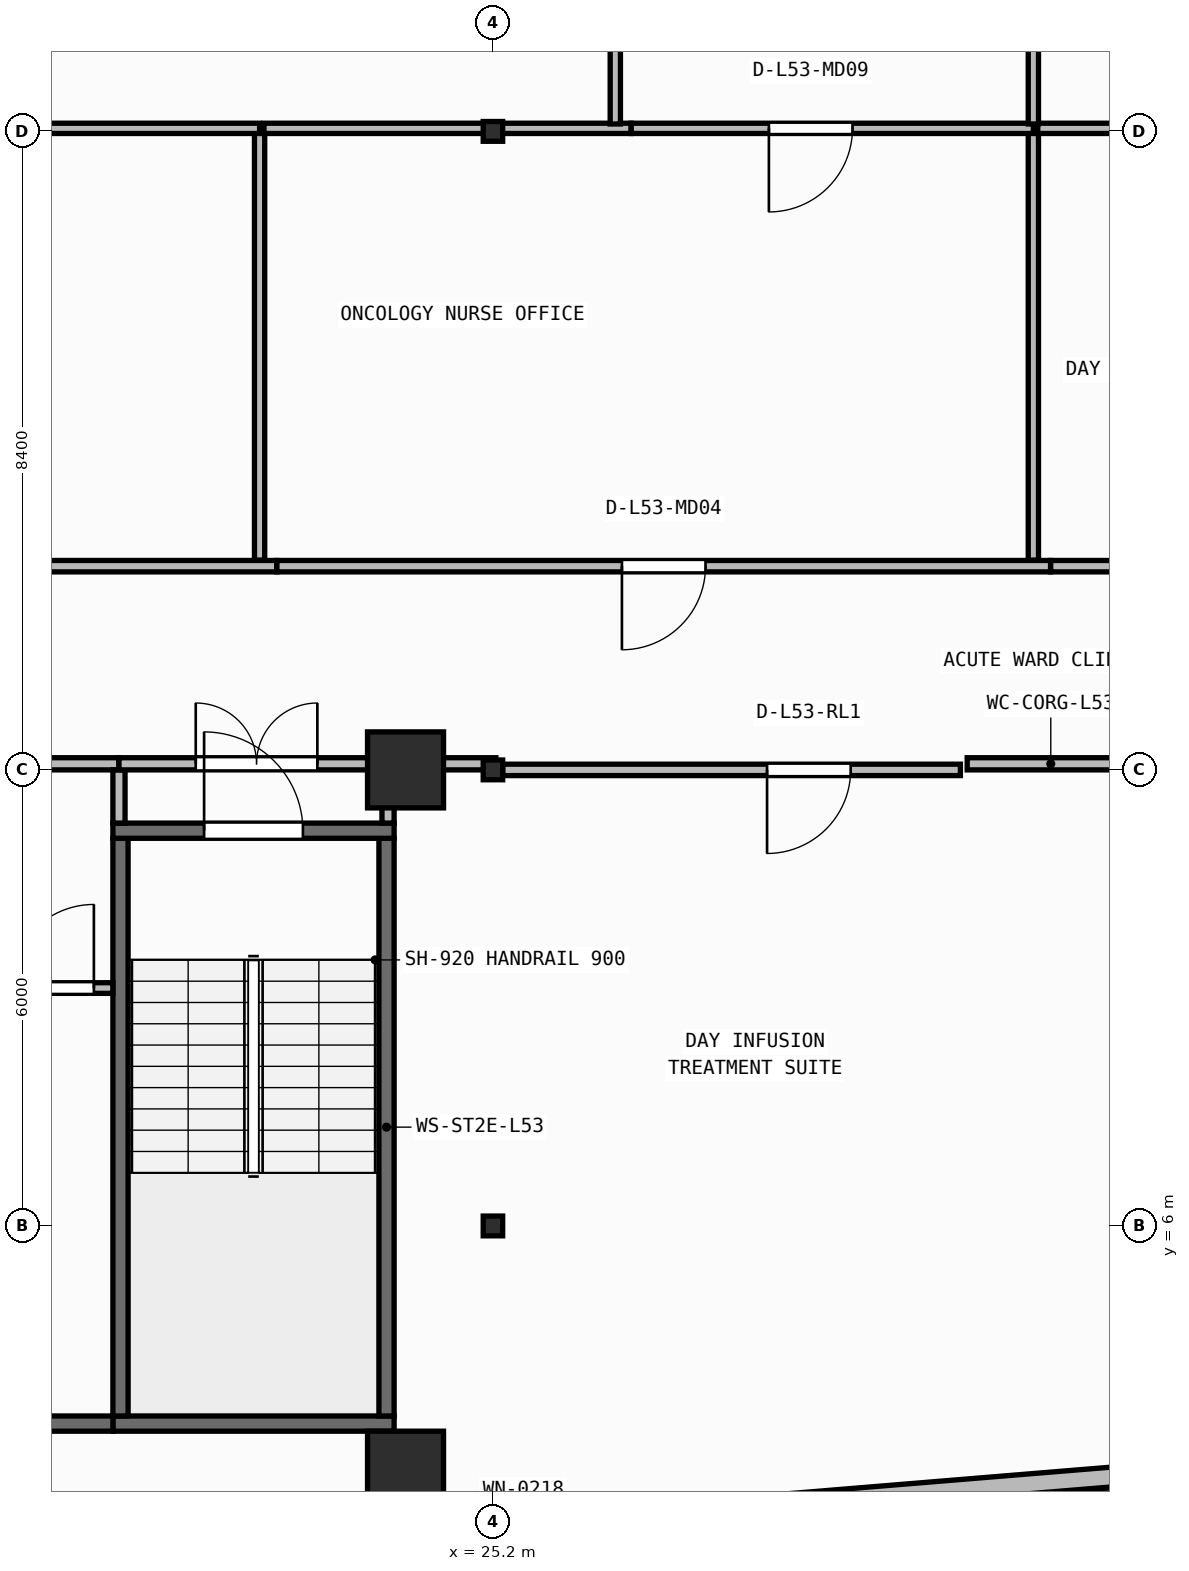
"""IFC4 building model, lengths in metres.
Left out: names, types, materials, properties, quantities, classifications, styles, units other than length and angle.
Written with IfcOpenShell. Run it as: python <this file> out.ifc"""

import sys

from ifc_helpers import new_model, si_unit, direction, frame, frame_2d, origin, origin_2d, place, context, subcontext, project, spatial, rectangle, i_section, extrude, element, fill, save


model = new_model("IFC4")
c1 = context("Model", 3, precision=1e-05, world=origin(), true_north=direction((0.0, 1.0)))
c2 = subcontext(c1, "Body", "Model", "MODEL_VIEW")
j1 = project(units=[si_unit("LENGTHUNIT", "METRE"), si_unit("PLANEANGLEUNIT", "RADIAN")], contexts=[c1])
p1 = place(None, origin())
s1 = spatial("IfcSite", under=j1, at=p1, CompositionType="ELEMENT")
p2 = place(p1, origin())
s2 = spatial("IfcBuilding", under=s1, at=p2, CompositionType="ELEMENT")
p3 = place(p2, frame((0.0, 0.0, 215.8)))
s3 = spatial("IfcBuildingStorey", under=s2, at=p3, CompositionType="ELEMENT", Elevation=215.8)
p4 = place(p3, frame((24.05, 2.8, 0.0), z_axis=(0.0, 0.0, 1.0), x_axis=(1.0, 0.0, 0.0)))
e1 = element("IfcColumn", 1, at=p4, inside=s3, PredefinedType="COLUMN", context=c2, shape_type="SweptSolid", body=[
    extrude(rectangle(XDim=1.0, YDim=1.0, at=origin_2d()), origin(), (0.0, 0.0, 1.0), 3.95),
])
p5 = place(p3, frame((25.2, 6.0, 0.0), z_axis=(0.0, 0.0, 1.0), x_axis=(1.0, 0.0, 0.0)))
e2 = element("IfcColumn", 2, at=p5, inside=s3, PredefinedType="COLUMN", context=c2, shape_type="SweptSolid", body=[
    extrude(i_section(OverallWidth=0.256, OverallDepth=0.26, WebThickness=0.01, FlangeThickness=0.017, FilletRadius=0.013, at=origin_2d()), origin(), (0.0, 0.0, 1.0), 3.95),
])
p6 = place(p3, frame((24.05, 12.0, 0.0), z_axis=(0.0, 0.0, 1.0), x_axis=(1.0, 0.0, 0.0)))
e3 = element("IfcColumn", 3, at=p6, inside=s3, PredefinedType="COLUMN", context=c2, shape_type="SweptSolid", body=[
    extrude(rectangle(XDim=1.0, YDim=1.0, at=origin_2d()), origin(), (0.0, 0.0, 1.0), 3.95),
])
for number, where, z_axis, x_axis in (
    (4, (25.2, 12.0, 0.0), (0.0, 0.0, 1.0), (1.0, 0.0, 0.0)),
    (5, (25.2, 20.4, 0.0), (0.0, 0.0, 1.0), (1.0, 0.0, 0.0)),
):
    element("IfcColumn", number, at=place(p3, frame(where, z_axis=z_axis, x_axis=x_axis)), inside=s3, PredefinedType="COLUMN", context=c2, shape_type="SweptSolid", body=[
        extrude(i_section(OverallWidth=0.256, OverallDepth=0.26, WebThickness=0.01, FlangeThickness=0.017, FilletRadius=0.013, at=origin_2d()), origin(), (0.0, 0.0, 1.0), 3.95),
    ])
p7 = place(p3, frame((2.66, 0.174, 0.0), z_axis=(0.0, 0.0, 1.0), x_axis=(0.996634028439, 0.081979347142, 0.0)))
e6 = element("IfcWall", 6, at=p7, inside=s3, PredefinedType="STANDARD", context=c2, shape_type="SweptSolid", body=[
    extrude(rectangle(XDim=46.035, YDim=0.26, at=frame_2d((23.018, 0.0))), origin(), (0.0, 0.0, 1.0), 3.71),
])
p8 = place(p7, frame((21.817, 0.0, 0.9)))
e7 = element("IfcOpeningElement", 7, at=p8, cuts=e6, PredefinedType="OPENING", context=c2, shape_type="SweptSolid", body=[
    extrude(rectangle(XDim=2.4, YDim=1.65, at=frame_2d((1.2, 0.825))), frame((0.0, 0.14, 0.0), z_axis=(0.0, -1.0, 0.0), x_axis=(1.0, 0.0, 0.0)), (0.0, 0.0, 1.0), 0.28),
])
p9 = place(p3, frame((20.2, 3.4, 0.0), z_axis=(0.0, 0.0, 1.0), x_axis=(1.0, 0.0, 0.0)))
e8 = element("IfcWall", 8, at=p9, inside=s3, PredefinedType="SHEAR", context=c2, shape_type="SweptSolid", body=[
    extrude(rectangle(XDim=3.7, YDim=0.2, at=frame_2d((1.85, 0.0))), origin(), (0.0, 0.0, 1.0), 3.71),
])
for number, where, z_axis, x_axis in (
    (9, (20.3, 3.5, 0.0), (0.0, 0.0, 1.0), (0.0, 1.0, 0.0)),
    (10, (23.8, 3.5, 0.0), (0.0, 0.0, 1.0), (0.0, 1.0, 0.0)),
):
    element("IfcWall", number, at=place(p3, frame(where, z_axis=z_axis, x_axis=x_axis)), inside=s3, PredefinedType="SHEAR", context=c2, shape_type="SweptSolid", body=[
        extrude(rectangle(XDim=7.6, YDim=0.2, at=frame_2d((3.8, 0.0))), origin(), (0.0, 0.0, 1.0), 3.71),
    ])
p10 = place(p3, frame((20.2, 11.2, 0.0), z_axis=(0.0, 0.0, 1.0), x_axis=(1.0, 0.0, 0.0)))
e11 = element("IfcWall", 11, at=p10, inside=s3, PredefinedType="SHEAR", context=c2, shape_type="SweptSolid", body=[
    extrude(rectangle(XDim=3.7, YDim=0.2, at=frame_2d((1.85, 0.0))), origin(), (0.0, 0.0, 1.0), 3.71),
])
p11 = place(p10, frame((1.2, 0.0, 0.0)))
e12 = element("IfcOpeningElement", 12, at=p11, cuts=e11, PredefinedType="OPENING", context=c2, shape_type="SweptSolid", body=[
    extrude(rectangle(XDim=1.3, YDim=2.15, at=frame_2d((0.65, 1.075))), frame((0.0, 0.11, 0.0), z_axis=(0.0, -1.0, 0.0), x_axis=(1.0, 0.0, 0.0)), (0.0, 0.0, 1.0), 0.22),
])
p12 = place(p3, frame((6.5, 3.4, 0.0), z_axis=(0.0, 0.0, 1.0), x_axis=(1.0, 0.0, 0.0)))
e13 = element("IfcWall", 13, at=p12, inside=s3, PredefinedType="SHEAR", context=c2, shape_type="SweptSolid", body=[
    extrude(rectangle(XDim=13.7, YDim=0.2, at=frame_2d((6.85, 0.0))), origin(), (0.0, 0.0, 1.0), 3.71),
])
p13 = place(p3, frame((18.61, 9.13, 0.0), z_axis=(0.0, 0.0, 1.0), x_axis=(1.0, 0.0, 0.0)))
e14 = element("IfcWall", 14, at=p13, inside=s3, PredefinedType="PARTITIONING", context=c2, shape_type="SweptSolid", body=[
    extrude(rectangle(XDim=1.59, YDim=0.14, at=frame_2d((0.795, 0.0))), origin(), (0.0, 0.0, 1.0), 3.71),
])
p14 = place(p13, frame((0.24, 0.0, 0.0)))
e15 = element("IfcOpeningElement", 15, at=p14, cuts=e14, PredefinedType="OPENING", context=c2, shape_type="SweptSolid", body=[
    extrude(rectangle(XDim=1.1, YDim=2.1, at=frame_2d((0.55, 1.05))), frame((0.0, 0.08, 0.0), z_axis=(0.0, -1.0, 0.0), x_axis=(1.0, 0.0, 0.0)), (0.0, 0.0, 1.0), 0.16),
])
p15 = place(p3, frame((12.58, 12.08, 0.0), z_axis=(0.0, 0.0, 1.0), x_axis=(1.0, 0.0, 0.0)))
e16 = element("IfcWall", 16, at=p15, inside=s3, PredefinedType="PARTITIONING", context=c2, shape_type="SweptSolid", body=[
    extrude(rectangle(XDim=7.7, YDim=0.16, at=frame_2d((3.85, 0.0))), origin(), (0.0, 0.0, 1.0), 3.152),
])
p16 = place(p15, frame((3.05, 0.0, 0.0)))
e17 = element("IfcOpeningElement", 17, at=p16, cuts=e16, PredefinedType="OPENING", context=c2, shape_type="SweptSolid", body=[
    extrude(rectangle(XDim=1.6, YDim=2.05, at=frame_2d((0.8, 1.025))), frame((0.0, 0.09, 0.0), z_axis=(0.0, -1.0, 0.0), x_axis=(1.0, 0.0, 0.0)), (0.0, 0.0, 1.0), 0.18),
])
p17 = place(p3, frame((20.28, 11.3, 0.0), z_axis=(0.0, 0.0, 1.0), x_axis=(0.0, 1.0, 0.0)))
e18 = element("IfcWall", 18, at=p17, inside=s3, PredefinedType="PARTITIONING", context=c2, shape_type="SweptSolid", body=[
    extrude(rectangle(XDim=0.7, YDim=0.16, at=frame_2d((0.35, 0.0))), origin(), (0.0, 0.0, 1.0), 3.71),
])
p18 = place(p3, frame((20.28, 12.08, 0.0), z_axis=(0.0, 0.0, 1.0), x_axis=(1.0, 0.0, 0.0)))
e19 = element("IfcWall", 19, at=p18, inside=s3, PredefinedType="PARTITIONING", context=c2, shape_type="SweptSolid", body=[
    extrude(rectangle(XDim=3.62, YDim=0.16, at=frame_2d((1.81, 0.0))), origin(), (0.0, 0.0, 1.0), 3.152),
])
p19 = place(p18, frame((1.01, 0.0, 0.0)))
e20 = element("IfcOpeningElement", 20, at=p19, cuts=e19, PredefinedType="OPENING", context=c2, shape_type="SweptSolid", body=[
    extrude(rectangle(XDim=1.6, YDim=2.05, at=frame_2d((0.8, 1.025))), frame((0.0, 0.09, 0.0), z_axis=(0.0, -1.0, 0.0), x_axis=(1.0, 0.0, 0.0)), (0.0, 0.0, 1.0), 0.18),
])
p20 = place(p3, frame((23.82, 11.3, 0.0), z_axis=(0.0, 0.0, 1.0), x_axis=(0.0, 1.0, 0.0)))
e21 = element("IfcWall", 21, at=p20, inside=s3, PredefinedType="PARTITIONING", context=c2, shape_type="SweptSolid", body=[
    extrude(rectangle(XDim=0.7, YDim=0.16, at=frame_2d((0.35, 0.0))), origin(), (0.0, 0.0, 1.0), 3.71),
])
p21 = place(p3, frame((31.35, 12.0, 0.0), z_axis=(0.0, 0.0, 1.0), x_axis=(-1.0, 0.0, 0.0)))
e22 = element("IfcWall", 22, at=p21, inside=s3, PredefinedType="PARTITIONING", context=c2, shape_type="SweptSolid", body=[
    extrude(rectangle(XDim=6.022, YDim=0.15, at=frame_2d((3.011, 0.0))), origin(), (0.0, 0.0, 1.0), 3.152),
])
p22 = place(p21, frame((1.444, 0.0, 0.0)))
e23 = element("IfcOpeningElement", 23, at=p22, cuts=e22, PredefinedType="OPENING", context=c2, shape_type="SweptSolid", body=[
    extrude(rectangle(XDim=1.1, YDim=2.1, at=frame_2d((0.55, 1.05))), frame((0.0, 0.085, 0.0), z_axis=(0.0, -1.0, 0.0), x_axis=(1.0, 0.0, 0.0)), (0.0, 0.0, 1.0), 0.17),
])
p23 = place(p3, frame((22.356, 14.68, 0.0), z_axis=(0.0, 0.0, 1.0), x_axis=(-1.0, 0.0, 0.0)))
e24 = element("IfcWall", 24, at=p23, inside=s3, PredefinedType="PARTITIONING", context=c2, shape_type="SweptSolid", body=[
    extrude(rectangle(XDim=8.802, YDim=0.15, at=frame_2d((4.401, 0.0))), origin(), (0.0, 0.0, 1.0), 3.71),
])
p24 = place(p23, frame((3.851, 0.0, 0.0)))
e25 = element("IfcOpeningElement", 25, at=p24, cuts=e24, PredefinedType="OPENING", context=c2, shape_type="SweptSolid", body=[
    extrude(rectangle(XDim=1.1, YDim=2.1, at=frame_2d((0.55, 1.05))), frame((0.0, 0.085, 0.0), z_axis=(0.0, -1.0, 0.0), x_axis=(1.0, 0.0, 0.0)), (0.0, 0.0, 1.0), 0.17),
])
p25 = place(p3, frame((32.536, 14.68, 0.0), z_axis=(0.0, 0.0, 1.0), x_axis=(-1.0, 0.0, 0.0)))
e26 = element("IfcWall", 26, at=p25, inside=s3, PredefinedType="PARTITIONING", context=c2, shape_type="SweptSolid", body=[
    extrude(rectangle(XDim=10.178, YDim=0.15, at=frame_2d((5.089, 0.0))), origin(), (0.0, 0.0, 1.0), 3.71),
])
p26 = place(p25, frame((4.539, 0.0, 0.0)))
e27 = element("IfcOpeningElement", 27, at=p26, cuts=e26, PredefinedType="OPENING", context=c2, shape_type="SweptSolid", body=[
    extrude(rectangle(XDim=1.1, YDim=2.1, at=frame_2d((0.55, 1.05))), frame((0.0, 0.085, 0.0), z_axis=(0.0, -1.0, 0.0), x_axis=(1.0, 0.0, 0.0)), (0.0, 0.0, 1.0), 0.17),
])
p27 = place(p3, frame((45.626, 14.68, 0.0), z_axis=(0.0, 0.0, 1.0), x_axis=(-1.0, 0.0, 0.0)))
e28 = element("IfcWall", 28, at=p27, inside=s3, PredefinedType="PARTITIONING", context=c2, shape_type="SweptSolid", body=[
    extrude(rectangle(XDim=13.088, YDim=0.15, at=frame_2d((6.544, 0.0))), origin(), (0.0, 0.0, 1.0), 3.71),
])
p28 = place(p27, frame((5.994, 0.0, 0.0)))
e29 = element("IfcOpeningElement", 29, at=p28, cuts=e28, PredefinedType="OPENING", context=c2, shape_type="SweptSolid", body=[
    extrude(rectangle(XDim=1.1, YDim=2.1, at=frame_2d((0.55, 1.05))), frame((0.0, 0.085, 0.0), z_axis=(0.0, -1.0, 0.0), x_axis=(1.0, 0.0, 0.0)), (0.0, 0.0, 1.0), 0.17),
])
p29 = place(p3, frame((22.13, 14.76, 0.0), z_axis=(0.0, 0.0, 1.0), x_axis=(0.0, 1.0, 0.0)))
e30 = element("IfcWall", 30, at=p29, inside=s3, PredefinedType="PARTITIONING", context=c2, shape_type="SweptSolid", body=[
    extrude(rectangle(XDim=5.68, YDim=0.135, at=frame_2d((2.84, 0.0))), origin(), (0.0, 0.0, 1.0), 3.71),
])
p30 = place(p3, frame((22.13, 20.44, 0.0), z_axis=(0.0, 0.0, 1.0), x_axis=(-1.0, 0.0, 0.0)))
e31 = element("IfcWall", 31, at=p30, inside=s3, PredefinedType="PARTITIONING", context=c2, shape_type="SweptSolid", body=[
    extrude(rectangle(XDim=8.35, YDim=0.135, at=frame_2d((4.175, 0.0))), origin(), (0.0, 0.0, 1.0), 3.152),
])
p31 = place(p3, frame((32.31, 14.76, 0.0), z_axis=(0.0, 0.0, 1.0), x_axis=(0.0, 1.0, 0.0)))
e32 = element("IfcWall", 32, at=p31, inside=s3, PredefinedType="PARTITIONING", context=c2, shape_type="SweptSolid", body=[
    extrude(rectangle(XDim=5.68, YDim=0.135, at=frame_2d((2.84, 0.0))), origin(), (0.0, 0.0, 1.0), 3.71),
])
p32 = place(p3, frame((27.018, 20.44, 0.0), z_axis=(0.0, 0.0, 1.0), x_axis=(-1.0, 0.0, 0.0)))
e33 = element("IfcWall", 33, at=p32, inside=s3, PredefinedType="PARTITIONING", context=c2, shape_type="SweptSolid", body=[
    extrude(rectangle(XDim=4.83, YDim=0.135, at=frame_2d((2.415, 0.0))), origin(), (0.0, 0.0, 1.0), 3.152),
])
p33 = place(p3, frame((32.31, 20.44, 0.0), z_axis=(0.0, 0.0, 1.0), x_axis=(-1.0, 0.0, 0.0)))
e34 = element("IfcWall", 34, at=p33, inside=s3, PredefinedType="PARTITIONING", context=c2, shape_type="SweptSolid", body=[
    extrude(rectangle(XDim=5.291, YDim=0.135, at=frame_2d((2.645, 0.0))), origin(), (0.0, 0.0, 1.0), 3.152),
])
p34 = place(p33, frame((2.379, 0.0, 0.0)))
e35 = element("IfcOpeningElement", 35, at=p34, cuts=e34, PredefinedType="OPENING", context=c2, shape_type="SweptSolid", body=[
    extrude(rectangle(XDim=1.1, YDim=2.1, at=frame_2d((0.55, 1.05))), frame((0.0, 0.077, 0.0), z_axis=(0.0, -1.0, 0.0), x_axis=(1.0, 0.0, 0.0)), (0.0, 0.0, 1.0), 0.155),
])
p35 = place(p3, frame((41.872, 20.44, 0.0), z_axis=(0.0, 0.0, 1.0), x_axis=(-1.0, 0.0, 0.0)))
e36 = element("IfcWall", 36, at=p35, inside=s3, PredefinedType="PARTITIONING", context=c2, shape_type="SweptSolid", body=[
    extrude(rectangle(XDim=9.505, YDim=0.135, at=frame_2d((4.752, 0.0))), origin(), (0.0, 0.0, 1.0), 3.152),
])
p36 = place(p35, frame((3.402, 0.0, 0.0)))
e37 = element("IfcOpeningElement", 37, at=p36, cuts=e36, PredefinedType="OPENING", context=c2, shape_type="SweptSolid", body=[
    extrude(rectangle(XDim=1.1, YDim=2.1, at=frame_2d((0.55, 1.05))), frame((0.0, 0.077, 0.0), z_axis=(0.0, -1.0, 0.0), x_axis=(1.0, 0.0, 0.0)), (0.0, 0.0, 1.0), 0.155),
])
for number, where, z_axis, x_axis in (
    (38, (26.81, 20.498, 0.0), (0.0, 0.0, 1.0), (0.0, 1.0, 0.0)),
    (39, (32.31, 20.498, 0.0), (0.0, 0.0, 1.0), (0.0, 1.0, 0.0)),
):
    element("IfcWall", number, at=place(p3, frame(where, z_axis=z_axis, x_axis=x_axis)), inside=s3, PredefinedType="PARTITIONING", context=c2, shape_type="SweptSolid", body=[
        extrude(rectangle(XDim=6.642, YDim=0.135, at=frame_2d((3.321, 0.0))), origin(), (0.0, 0.0, 1.0), 3.71),
    ])
p37 = place(p3, frame((24.02, 12.08, 0.0), z_axis=(0.0, 0.0, 1.0), x_axis=(1.0, 0.0, 0.0)))
e40 = element("IfcWall", 40, at=p37, inside=s3, PredefinedType="PARTITIONING", context=c2, shape_type="SweptSolid", body=[
    extrude(rectangle(XDim=1.219, YDim=0.16, at=frame_2d((0.609, 0.0))), origin(), (0.0, 0.0, 1.0), 3.152),
])
p38 = place(p3, frame((31.439, 12.08, 0.0), z_axis=(0.0, 0.0, 1.0), x_axis=(1.0, 0.0, 0.0)))
e41 = element("IfcWall", 41, at=p38, inside=s3, PredefinedType="PARTITIONING", context=c2, shape_type="SweptSolid", body=[
    extrude(rectangle(XDim=2.199, YDim=0.16, at=frame_2d((1.1, 0.0))), origin(), (0.0, 0.0, 1.0), 3.152),
])
p39 = place(p11, origin())
e42 = element("IfcDoor", 42, at=p39, inside=s3, OperationType="SINGLE_SWING_LEFT", PredefinedType="DOOR", context=c2, shape_type="SweptSolid", body=[
    extrude(rectangle(XDim=1.3, YDim=2.15, at=frame_2d((0.65, 1.075))), frame((0.0, 0.025, 0.0), z_axis=(0.0, -1.0, 0.0), x_axis=(1.0, 0.0, 0.0)), (0.0, 0.0, 1.0), 0.05),
])
fill(e12, e42)
p40 = place(p14, origin())
e43 = element("IfcDoor", 43, at=p40, inside=s3, OperationType="SINGLE_SWING_RIGHT", PredefinedType="DOOR", context=c2, shape_type="SweptSolid", body=[
    extrude(rectangle(XDim=1.1, YDim=2.1, at=frame_2d((0.55, 1.05))), frame((0.0, 0.025, 0.0), z_axis=(0.0, -1.0, 0.0), x_axis=(1.0, 0.0, 0.0)), (0.0, 0.0, 1.0), 0.05),
])
fill(e15, e43)
p41 = place(p19, origin())
e44 = element("IfcDoor", 44, at=p41, inside=s3, OperationType="DOUBLE_DOOR_SINGLE_SWING", PredefinedType="DOOR", context=c2, shape_type="SweptSolid", body=[
    extrude(rectangle(XDim=1.6, YDim=2.05, at=frame_2d((0.8, 1.025))), frame((0.0, 0.025, 0.0), z_axis=(0.0, -1.0, 0.0), x_axis=(1.0, 0.0, 0.0)), (0.0, 0.0, 1.0), 0.05),
])
fill(e20, e44)
p42 = place(p22, origin())
e45 = element("IfcDoor", 45, at=p42, inside=s3, OperationType="SINGLE_SWING_RIGHT", PredefinedType="DOOR", context=c2, shape_type="SweptSolid", body=[
    extrude(rectangle(XDim=1.1, YDim=2.1, at=frame_2d((0.55, 1.05))), frame((0.0, 0.025, 0.0), z_axis=(0.0, -1.0, 0.0), x_axis=(1.0, 0.0, 0.0)), (0.0, 0.0, 1.0), 0.05),
])
fill(e23, e45)
p43 = place(p26, origin())
e46 = element("IfcDoor", 46, at=p43, inside=s3, OperationType="SINGLE_SWING_RIGHT", PredefinedType="DOOR", context=c2, shape_type="SweptSolid", body=[
    extrude(rectangle(XDim=1.1, YDim=2.1, at=frame_2d((0.55, 1.05))), frame((0.0, 0.025, 0.0), z_axis=(0.0, -1.0, 0.0), x_axis=(1.0, 0.0, 0.0)), (0.0, 0.0, 1.0), 0.05),
])
fill(e27, e46)
p44 = place(p34, origin())
e47 = element("IfcDoor", 47, at=p44, inside=s3, OperationType="SINGLE_SWING_RIGHT", PredefinedType="DOOR", context=c2, shape_type="SweptSolid", body=[
    extrude(rectangle(XDim=1.1, YDim=2.1, at=frame_2d((0.55, 1.05))), frame((0.0, 0.025, 0.0), z_axis=(0.0, -1.0, 0.0), x_axis=(1.0, 0.0, 0.0)), (0.0, 0.0, 1.0), 0.05),
])
fill(e35, e47)
save(model, sys.argv[1])
